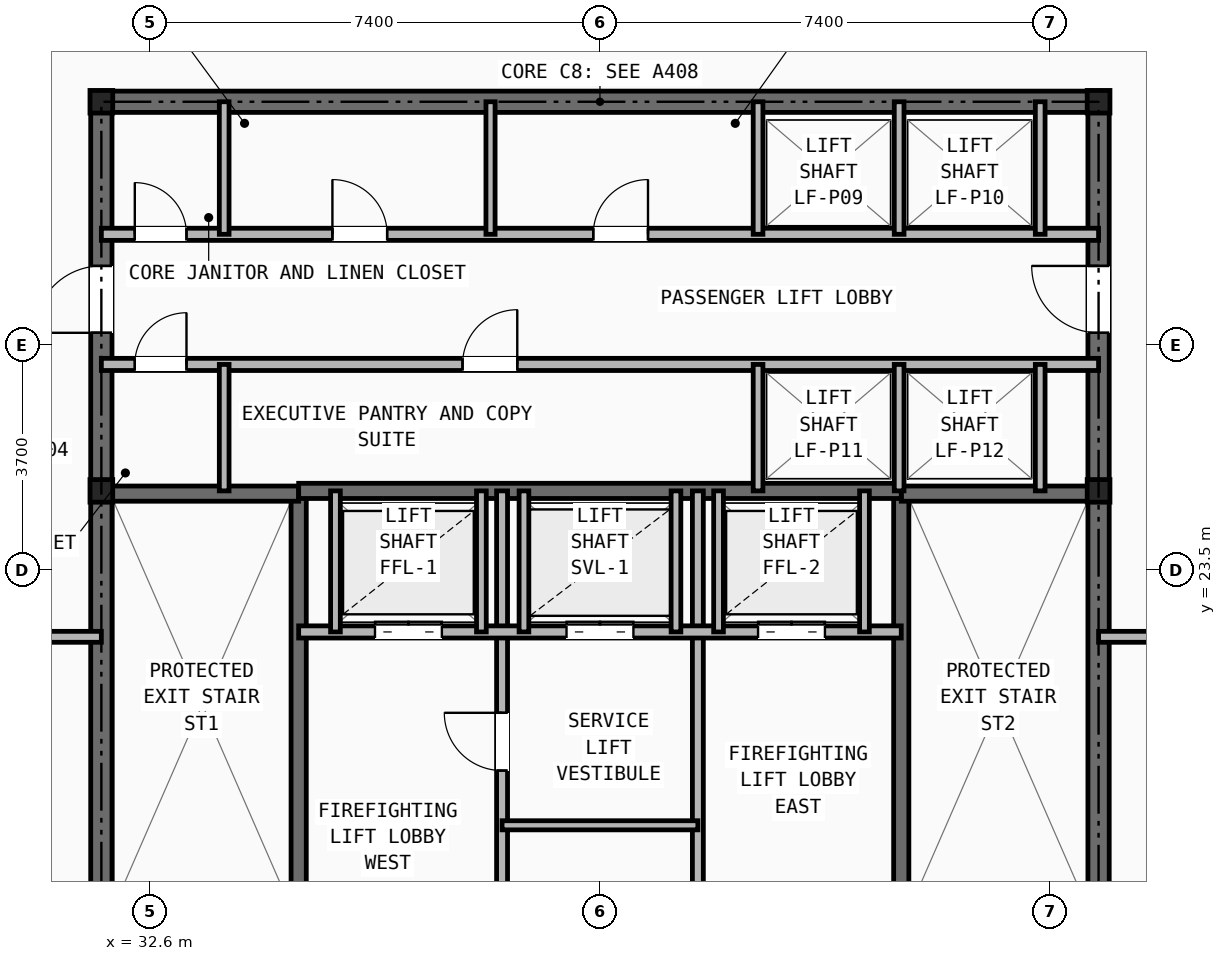
"""IFC4 building model, lengths in metres.
Left out: names, types, materials, properties, quantities, classifications, styles, units other than length and angle.
Written with IfcOpenShell. Run it as: python <this file> out.ifc"""

import sys

from ifc_helpers import new_model, si_unit, direction, frame, frame_2d, origin, origin_2d, place, context, subcontext, project, spatial, rectangle, i_section, extrude, element, fill, save


model = new_model("IFC4")
c1 = context("Model", 3, precision=1e-05, world=origin(), true_north=direction((0.0, 1.0)))
c2 = subcontext(c1, "Body", "Model", "MODEL_VIEW")
j1 = project(units=[si_unit("LENGTHUNIT", "METRE"), si_unit("PLANEANGLEUNIT", "RADIAN")], contexts=[c1])
p1 = place(None, origin())
s1 = spatial("IfcSite", under=j1, at=p1, CompositionType="ELEMENT")
p2 = place(p1, origin())
s2 = spatial("IfcBuilding", under=s1, at=p2, CompositionType="ELEMENT")
p3 = place(p2, frame((0.0, 0.0, 290.0)))
s3 = spatial("IfcBuildingStorey", under=s2, at=p3, CompositionType="ELEMENT", Elevation=290.0)
for number, where, z_axis, x_axis in (
    (1, (31.8, 24.8, 0.0), (0.0, 0.0, 1.0), (1.0, 0.0, 0.0)),
    (2, (48.2, 24.8, 0.0), (0.0, 0.0, 1.0), (1.0, 0.0, 0.0)),
    (3, (31.8, 31.2, 0.0), (0.0, 0.0, 1.0), (1.0, 0.0, 0.0)),
    (4, (48.2, 31.2, 0.0), (0.0, 0.0, 1.0), (1.0, 0.0, 0.0)),
):
    element("IfcColumn", number, at=place(p3, frame(where, z_axis=z_axis, x_axis=x_axis)), inside=s3, PredefinedType="COLUMN", context=c2, shape_type="SweptSolid", body=[
        extrude(i_section(OverallWidth=0.374, OverallDepth=0.372, WebThickness=0.016, FlangeThickness=0.026, at=origin_2d()), origin(), (0.0, 0.0, 1.0), 4.8),
    ])
p4 = place(p3, frame((31.8, 31.2, 0.0), z_axis=(0.0, 0.0, 1.0), x_axis=(1.0, 0.0, 0.0)))
e5 = element("IfcWall", 5, at=p4, inside=s3, PredefinedType="SHEAR", context=c2, shape_type="SweptSolid", body=[
    extrude(rectangle(XDim=16.4, YDim=0.35, at=frame_2d((8.2, 0.0))), origin(), (0.0, 0.0, 1.0), 4.54),
])
p5 = place(p3, frame((31.8, 16.4, 0.0), z_axis=(0.0, 0.0, 1.0), x_axis=(0.0, 1.0, 0.0)))
e6 = element("IfcWall", 6, at=p5, inside=s3, PredefinedType="SHEAR", context=c2, shape_type="SweptSolid", body=[
    extrude(rectangle(XDim=14.8, YDim=0.35, at=frame_2d((7.4, 0.0))), origin(), (0.0, 0.0, 1.0), 4.54),
])
p6 = place(p5, frame((11.0, 0.0, 0.0)))
e7 = element("IfcOpeningElement", 7, at=p6, cuts=e6, PredefinedType="OPENING", context=c2, shape_type="SweptSolid", body=[
    extrude(rectangle(XDim=1.1, YDim=2.15, at=frame_2d((0.55, 1.075))), frame((0.0, 0.185, 0.0), z_axis=(0.0, -1.0, 0.0), x_axis=(1.0, 0.0, 0.0)), (0.0, 0.0, 1.0), 0.37),
])
p7 = place(p5, frame((0.45, 0.0, 0.0)))
e8 = element("IfcOpeningElement", 8, at=p7, cuts=e6, PredefinedType="OPENING", context=c2, shape_type="SweptSolid", body=[
    extrude(rectangle(XDim=0.95, YDim=2.1, at=frame_2d((0.475, 1.05))), frame((0.0, 0.185, 0.0), z_axis=(0.0, -1.0, 0.0), x_axis=(1.0, 0.0, 0.0)), (0.0, 0.0, 1.0), 0.37),
])
p8 = place(p3, frame((48.2, 16.4, 0.0), z_axis=(0.0, 0.0, 1.0), x_axis=(0.0, 1.0, 0.0)))
e9 = element("IfcWall", 9, at=p8, inside=s3, PredefinedType="SHEAR", context=c2, shape_type="SweptSolid", body=[
    extrude(rectangle(XDim=14.8, YDim=0.35, at=frame_2d((7.4, 0.0))), origin(), (0.0, 0.0, 1.0), 4.54),
])
p9 = place(p8, frame((11.0, 0.0, 0.0)))
e10 = element("IfcOpeningElement", 10, at=p9, cuts=e9, PredefinedType="OPENING", context=c2, shape_type="SweptSolid", body=[
    extrude(rectangle(XDim=1.1, YDim=2.15, at=frame_2d((0.55, 1.075))), frame((0.0, 0.185, 0.0), z_axis=(0.0, -1.0, 0.0), x_axis=(1.0, 0.0, 0.0)), (0.0, 0.0, 1.0), 0.37),
])
p10 = place(p8, frame((0.45, 0.0, 0.0)))
e11 = element("IfcOpeningElement", 11, at=p10, cuts=e9, PredefinedType="OPENING", context=c2, shape_type="SweptSolid", body=[
    extrude(rectangle(XDim=0.95, YDim=2.1, at=frame_2d((0.475, 1.05))), frame((0.0, 0.185, 0.0), z_axis=(0.0, -1.0, 0.0), x_axis=(1.0, 0.0, 0.0)), (0.0, 0.0, 1.0), 0.37),
])
p11 = place(p3, frame((35.045, 16.4, 0.0), z_axis=(0.0, 0.0, 1.0), x_axis=(0.0, 1.0, 0.0)))
e12 = element("IfcWall", 12, at=p11, inside=s3, PredefinedType="SHEAR", context=c2, shape_type="SweptSolid", body=[
    extrude(rectangle(XDim=8.4, YDim=0.25, at=frame_2d((4.2, 0.0))), origin(), (0.0, 0.0, 1.0), 4.54),
])
p12 = place(p11, frame((0.45, 0.0, 0.0)))
e13 = element("IfcOpeningElement", 13, at=p12, cuts=e12, PredefinedType="OPENING", context=c2, shape_type="SweptSolid", body=[
    extrude(rectangle(XDim=0.95, YDim=2.1, at=frame_2d((0.475, 1.05))), frame((0.0, 0.135, 0.0), z_axis=(0.0, -1.0, 0.0), x_axis=(1.0, 0.0, 0.0)), (0.0, 0.0, 1.0), 0.27),
])
p13 = place(p3, frame((31.8, 24.755, 0.0), z_axis=(0.0, 0.0, 1.0), x_axis=(1.0, 0.0, 0.0)))
e14 = element("IfcWall", 14, at=p13, inside=s3, PredefinedType="SHEAR", context=c2, shape_type="SweptSolid", body=[
    extrude(rectangle(XDim=3.245, YDim=0.25, at=frame_2d((1.623, 0.0))), origin(), (0.0, 0.0, 1.0), 4.54),
])
p14 = place(p3, frame((44.955, 16.4, 0.0), z_axis=(0.0, 0.0, 1.0), x_axis=(0.0, 1.0, 0.0)))
e15 = element("IfcWall", 15, at=p14, inside=s3, PredefinedType="SHEAR", context=c2, shape_type="SweptSolid", body=[
    extrude(rectangle(XDim=8.4, YDim=0.25, at=frame_2d((4.2, 0.0))), origin(), (0.0, 0.0, 1.0), 4.54),
])
p15 = place(p14, frame((0.45, 0.0, 0.0)))
e16 = element("IfcOpeningElement", 16, at=p15, cuts=e15, PredefinedType="OPENING", context=c2, shape_type="SweptSolid", body=[
    extrude(rectangle(XDim=0.95, YDim=2.1, at=frame_2d((0.475, 1.05))), frame((0.0, 0.135, 0.0), z_axis=(0.0, -1.0, 0.0), x_axis=(1.0, 0.0, 0.0)), (0.0, 0.0, 1.0), 0.27),
])
p16 = place(p3, frame((44.955, 24.755, 0.0), z_axis=(0.0, 0.0, 1.0), x_axis=(1.0, 0.0, 0.0)))
e17 = element("IfcWall", 17, at=p16, inside=s3, PredefinedType="SHEAR", context=c2, shape_type="SweptSolid", body=[
    extrude(rectangle(XDim=3.245, YDim=0.25, at=frame_2d((1.623, 0.0))), origin(), (0.0, 0.0, 1.0), 4.54),
])
p17 = place(p3, frame((35.045, 24.8, 0.0), z_axis=(0.0, 0.0, 1.0), x_axis=(1.0, 0.0, 0.0)))
e18 = element("IfcWall", 18, at=p17, inside=s3, PredefinedType="SHEAR", context=c2, shape_type="SweptSolid", body=[
    extrude(rectangle(XDim=9.91, YDim=0.25, at=frame_2d((4.955, 0.0))), origin(), (0.0, 0.0, 1.0), 4.54),
])
p18 = place(p3, frame((38.39, 16.4, 0.0), z_axis=(0.0, 0.0, 1.0), x_axis=(0.0, 1.0, 0.0)))
e19 = element("IfcWall", 19, at=p18, inside=s3, PredefinedType="PARTITIONING", context=c2, shape_type="SweptSolid", body=[
    extrude(rectangle(XDim=8.4, YDim=0.18, at=frame_2d((4.2, 0.0))), origin(), (0.0, 0.0, 1.0), 3.995),
])
p19 = place(p18, frame((3.8, 0.0, 0.0)))
e20 = element("IfcOpeningElement", 20, at=p19, cuts=e19, PredefinedType="OPENING", context=c2, shape_type="SweptSolid", body=[
    extrude(rectangle(XDim=0.95, YDim=2.1, at=frame_2d((0.475, 1.05))), frame((0.0, 0.1, 0.0), z_axis=(0.0, -1.0, 0.0), x_axis=(1.0, 0.0, 0.0)), (0.0, 0.0, 1.0), 0.2),
])
p20 = place(p3, frame((41.61, 16.4, 0.0), z_axis=(0.0, 0.0, 1.0), x_axis=(0.0, 1.0, 0.0)))
e21 = element("IfcWall", 21, at=p20, inside=s3, PredefinedType="PARTITIONING", context=c2, shape_type="SweptSolid", body=[
    extrude(rectangle(XDim=8.4, YDim=0.18, at=frame_2d((4.2, 0.0))), origin(), (0.0, 0.0, 1.0), 3.995),
])
p21 = place(p3, frame((35.045, 22.48, 0.0), z_axis=(0.0, 0.0, 1.0), x_axis=(1.0, 0.0, 0.0)))
e22 = element("IfcWall", 22, at=p21, inside=s3, PredefinedType="SOLIDWALL", context=c2, shape_type="SweptSolid", body=[
    extrude(rectangle(XDim=9.91, YDim=0.2, at=frame_2d((4.955, 0.0))), origin(), (0.0, 0.0, 1.0), 4.54),
])
p22 = place(p21, frame((1.255, 0.0, 0.0)))
e23 = element("IfcOpeningElement", 23, at=p22, cuts=e22, PredefinedType="OPENING", context=c2, shape_type="SweptSolid", body=[
    extrude(rectangle(XDim=1.1, YDim=2.15, at=frame_2d((0.55, 1.075))), frame((0.0, 0.11, 0.0), z_axis=(0.0, -1.0, 0.0), x_axis=(1.0, 0.0, 0.0)), (0.0, 0.0, 1.0), 0.22),
])
p23 = place(p21, frame((7.555, 0.0, 0.0)))
e24 = element("IfcOpeningElement", 24, at=p23, cuts=e22, PredefinedType="OPENING", context=c2, shape_type="SweptSolid", body=[
    extrude(rectangle(XDim=1.1, YDim=2.15, at=frame_2d((0.55, 1.075))), frame((0.0, 0.11, 0.0), z_axis=(0.0, -1.0, 0.0), x_axis=(1.0, 0.0, 0.0)), (0.0, 0.0, 1.0), 0.22),
])
p24 = place(p21, frame((4.405, 0.0, 0.0)))
e25 = element("IfcOpeningElement", 25, at=p24, cuts=e22, PredefinedType="OPENING", context=c2, shape_type="SweptSolid", body=[
    extrude(rectangle(XDim=1.1, YDim=2.15, at=frame_2d((0.55, 1.075))), frame((0.0, 0.11, 0.0), z_axis=(0.0, -1.0, 0.0), x_axis=(1.0, 0.0, 0.0)), (0.0, 0.0, 1.0), 0.22),
])
p25 = place(p3, frame((38.39, 19.3, 0.0), z_axis=(0.0, 0.0, 1.0), x_axis=(1.0, 0.0, 0.0)))
e26 = element("IfcWall", 26, at=p25, inside=s3, PredefinedType="PARTITIONING", context=c2, shape_type="SweptSolid", body=[
    extrude(rectangle(XDim=3.22, YDim=0.15, at=frame_2d((1.61, 0.0))), origin(), (0.0, 0.0, 1.0), 4.54),
])
for number, where, z_axis, x_axis in (
    (27, (35.65, 22.48, 0.0), (0.0, 0.0, 1.0), (0.0, 1.0, 0.0)),
    (28, (38.05, 22.48, 0.0), (0.0, 0.0, 1.0), (0.0, 1.0, 0.0)),
    (29, (41.95, 22.48, 0.0), (0.0, 0.0, 1.0), (0.0, 1.0, 0.0)),
    (30, (44.35, 22.48, 0.0), (0.0, 0.0, 1.0), (0.0, 1.0, 0.0)),
    (31, (38.75, 22.48, 0.0), (0.0, 0.0, 1.0), (0.0, 1.0, 0.0)),
    (32, (41.25, 22.48, 0.0), (0.0, 0.0, 1.0), (0.0, 1.0, 0.0)),
):
    element("IfcWall", number, at=place(p3, frame(where, z_axis=z_axis, x_axis=x_axis)), inside=s3, PredefinedType="SOLIDWALL", context=c2, shape_type="SweptSolid", body=[
        extrude(rectangle(XDim=2.32, YDim=0.16, at=frame_2d((1.16, 0.0))), origin(), (0.0, 0.0, 1.0), 4.54),
    ])
p26 = place(p3, frame((31.8, 29.02, 0.0), z_axis=(0.0, 0.0, 1.0), x_axis=(1.0, 0.0, 0.0)))
e33 = element("IfcWall", 33, at=p26, inside=s3, PredefinedType="SOLIDWALL", context=c2, shape_type="SweptSolid", body=[
    extrude(rectangle(XDim=16.4, YDim=0.2, at=frame_2d((8.2, 0.0))), origin(), (0.0, 0.0, 1.0), 3.995),
])
p27 = place(p26, frame((0.55, 0.0, 0.0)))
e34 = element("IfcOpeningElement", 34, at=p27, cuts=e33, PredefinedType="OPENING", context=c2, shape_type="SweptSolid", body=[
    extrude(rectangle(XDim=0.85, YDim=2.05, at=frame_2d((0.425, 1.025))), frame((0.0, 0.11, 0.0), z_axis=(0.0, -1.0, 0.0), x_axis=(1.0, 0.0, 0.0)), (0.0, 0.0, 1.0), 0.22),
])
p28 = place(p26, frame((3.8, 0.0, 0.0)))
e35 = element("IfcOpeningElement", 35, at=p28, cuts=e33, PredefinedType="OPENING", context=c2, shape_type="SweptSolid", body=[
    extrude(rectangle(XDim=0.9, YDim=2.1, at=frame_2d((0.45, 1.05))), frame((0.0, 0.11, 0.0), z_axis=(0.0, -1.0, 0.0), x_axis=(1.0, 0.0, 0.0)), (0.0, 0.0, 1.0), 0.22),
])
p29 = place(p26, frame((8.09, 0.0, 0.0)))
e36 = element("IfcOpeningElement", 36, at=p29, cuts=e33, PredefinedType="OPENING", context=c2, shape_type="SweptSolid", body=[
    extrude(rectangle(XDim=0.9, YDim=2.1, at=frame_2d((0.45, 1.05))), frame((0.0, 0.11, 0.0), z_axis=(0.0, -1.0, 0.0), x_axis=(1.0, 0.0, 0.0)), (0.0, 0.0, 1.0), 0.22),
])
p30 = place(p3, frame((31.8, 26.88, 0.0), z_axis=(0.0, 0.0, 1.0), x_axis=(1.0, 0.0, 0.0)))
e37 = element("IfcWall", 37, at=p30, inside=s3, PredefinedType="SOLIDWALL", context=c2, shape_type="SweptSolid", body=[
    extrude(rectangle(XDim=16.4, YDim=0.2, at=frame_2d((8.2, 0.0))), origin(), (0.0, 0.0, 1.0), 3.995),
])
p31 = place(p30, frame((0.55, 0.0, 0.0)))
e38 = element("IfcOpeningElement", 38, at=p31, cuts=e37, PredefinedType="OPENING", context=c2, shape_type="SweptSolid", body=[
    extrude(rectangle(XDim=0.85, YDim=2.05, at=frame_2d((0.425, 1.025))), frame((0.0, 0.11, 0.0), z_axis=(0.0, -1.0, 0.0), x_axis=(1.0, 0.0, 0.0)), (0.0, 0.0, 1.0), 0.22),
])
p32 = place(p30, frame((5.94, 0.0, 0.0)))
e39 = element("IfcOpeningElement", 39, at=p32, cuts=e37, PredefinedType="OPENING", context=c2, shape_type="SweptSolid", body=[
    extrude(rectangle(XDim=0.9, YDim=2.1, at=frame_2d((0.45, 1.05))), frame((0.0, 0.11, 0.0), z_axis=(0.0, -1.0, 0.0), x_axis=(1.0, 0.0, 0.0)), (0.0, 0.0, 1.0), 0.22),
])
p33 = place(p3, frame((33.82, 29.02, 0.0), z_axis=(0.0, 0.0, 1.0), x_axis=(0.0, 1.0, 0.0)))
e40 = element("IfcWall", 40, at=p33, inside=s3, PredefinedType="SOLIDWALL", context=c2, shape_type="SweptSolid", body=[
    extrude(rectangle(XDim=2.18, YDim=0.16, at=frame_2d((1.09, 0.0))), origin(), (0.0, 0.0, 1.0), 3.995),
])
p34 = place(p3, frame((33.82, 24.8, 0.0), z_axis=(0.0, 0.0, 1.0), x_axis=(0.0, 1.0, 0.0)))
e41 = element("IfcWall", 41, at=p34, inside=s3, PredefinedType="SOLIDWALL", context=c2, shape_type="SweptSolid", body=[
    extrude(rectangle(XDim=2.08, YDim=0.16, at=frame_2d((1.04, 0.0))), origin(), (0.0, 0.0, 1.0), 4.54),
])
p35 = place(p3, frame((38.2, 29.02, 0.0), z_axis=(0.0, 0.0, 1.0), x_axis=(0.0, 1.0, 0.0)))
e42 = element("IfcWall", 42, at=p35, inside=s3, PredefinedType="PARTITIONING", context=c2, shape_type="SweptSolid", body=[
    extrude(rectangle(XDim=2.18, YDim=0.15, at=frame_2d((1.09, 0.0))), origin(), (0.0, 0.0, 1.0), 3.995),
])
for number, where, z_axis, x_axis in (
    (43, (42.6, 29.02, 0.0), (0.0, 0.0, 1.0), (0.0, 1.0, 0.0)),
    (44, (44.92, 29.02, 0.0), (0.0, 0.0, 1.0), (0.0, 1.0, 0.0)),
    (45, (47.24, 29.02, 0.0), (0.0, 0.0, 1.0), (0.0, 1.0, 0.0)),
):
    element("IfcWall", number, at=place(p3, frame(where, z_axis=z_axis, x_axis=x_axis)), inside=s3, PredefinedType="SOLIDWALL", context=c2, shape_type="SweptSolid", body=[
        extrude(rectangle(XDim=2.18, YDim=0.16, at=frame_2d((1.09, 0.0))), origin(), (0.0, 0.0, 1.0), 3.995),
    ])
for number, where, z_axis, x_axis in (
    (46, (42.6, 24.8, 0.0), (0.0, 0.0, 1.0), (0.0, 1.0, 0.0)),
    (47, (44.92, 24.8, 0.0), (0.0, 0.0, 1.0), (0.0, 1.0, 0.0)),
    (48, (47.24, 24.8, 0.0), (0.0, 0.0, 1.0), (0.0, 1.0, 0.0)),
):
    element("IfcWall", number, at=place(p3, frame(where, z_axis=z_axis, x_axis=x_axis)), inside=s3, PredefinedType="SOLIDWALL", context=c2, shape_type="SweptSolid", body=[
        extrude(rectangle(XDim=2.08, YDim=0.16, at=frame_2d((1.04, 0.0))), origin(), (0.0, 0.0, 1.0), 4.54),
    ])
p36 = place(p3, frame((25.8, 22.4, 0.0), z_axis=(0.0, 0.0, 1.0), x_axis=(1.0, 0.0, 0.0)))
e49 = element("IfcWall", 49, at=p36, inside=s3, PredefinedType="PARTITIONING", context=c2, shape_type="SweptSolid", body=[
    extrude(rectangle(XDim=6.0, YDim=0.18, at=frame_2d((3.0, 0.0))), origin(), (0.0, 0.0, 1.0), 3.995),
])
p37 = place(p36, frame((1.6, 0.0, 0.0)))
e50 = element("IfcOpeningElement", 50, at=p37, cuts=e49, PredefinedType="OPENING", context=c2, shape_type="SweptSolid", body=[
    extrude(rectangle(XDim=1.0, YDim=2.15, at=frame_2d((0.5, 1.075))), frame((0.0, 0.1, 0.0), z_axis=(0.0, -1.0, 0.0), x_axis=(1.0, 0.0, 0.0)), (0.0, 0.0, 1.0), 0.2),
])
p38 = place(p3, frame((48.2, 22.4, 0.0), z_axis=(0.0, 0.0, 1.0), x_axis=(1.0, 0.0, 0.0)))
e51 = element("IfcWall", 51, at=p38, inside=s3, PredefinedType="PARTITIONING", context=c2, shape_type="SweptSolid", body=[
    extrude(rectangle(XDim=6.0, YDim=0.18, at=frame_2d((3.0, 0.0))), origin(), (0.0, 0.0, 1.0), 3.995),
])
p39 = place(p38, frame((1.6, 0.0, 0.0)))
e52 = element("IfcOpeningElement", 52, at=p39, cuts=e51, PredefinedType="OPENING", context=c2, shape_type="SweptSolid", body=[
    extrude(rectangle(XDim=1.0, YDim=2.15, at=frame_2d((0.5, 1.075))), frame((0.0, 0.1, 0.0), z_axis=(0.0, -1.0, 0.0), x_axis=(1.0, 0.0, 0.0)), (0.0, 0.0, 1.0), 0.2),
])
p40 = place(p19, origin())
e53 = element("IfcDoor", 53, at=p40, inside=s3, OperationType="SINGLE_SWING_RIGHT", PredefinedType="DOOR", context=c2, shape_type="SweptSolid", body=[
    extrude(rectangle(XDim=0.95, YDim=2.1, at=frame_2d((0.475, 1.05))), frame((0.0, 0.025, 0.0), z_axis=(0.0, -1.0, 0.0), x_axis=(1.0, 0.0, 0.0)), (0.0, 0.0, 1.0), 0.05),
])
fill(e20, e53)
p41 = place(p22, origin())
e54 = element("IfcDoor", 54, at=p41, inside=s3, OperationType="DOUBLE_DOOR_SLIDING", PredefinedType="DOOR", context=c2, shape_type="SweptSolid", body=[
    extrude(rectangle(XDim=1.1, YDim=2.15, at=frame_2d((0.55, 1.075))), frame((0.0, 0.025, 0.0), z_axis=(0.0, -1.0, 0.0), x_axis=(1.0, 0.0, 0.0)), (0.0, 0.0, 1.0), 0.05),
])
fill(e23, e54)
p42 = place(p23, origin())
e55 = element("IfcDoor", 55, at=p42, inside=s3, OperationType="DOUBLE_DOOR_SLIDING", PredefinedType="DOOR", context=c2, shape_type="SweptSolid", body=[
    extrude(rectangle(XDim=1.1, YDim=2.15, at=frame_2d((0.55, 1.075))), frame((0.0, 0.025, 0.0), z_axis=(0.0, -1.0, 0.0), x_axis=(1.0, 0.0, 0.0)), (0.0, 0.0, 1.0), 0.05),
])
fill(e24, e55)
p43 = place(p24, origin())
e56 = element("IfcDoor", 56, at=p43, inside=s3, OperationType="DOUBLE_DOOR_SLIDING", PredefinedType="DOOR", context=c2, shape_type="SweptSolid", body=[
    extrude(rectangle(XDim=1.1, YDim=2.15, at=frame_2d((0.55, 1.075))), frame((0.0, 0.025, 0.0), z_axis=(0.0, -1.0, 0.0), x_axis=(1.0, 0.0, 0.0)), (0.0, 0.0, 1.0), 0.05),
])
fill(e25, e56)
p44 = place(p27, origin())
e57 = element("IfcDoor", 57, at=p44, inside=s3, OperationType="SINGLE_SWING_LEFT", PredefinedType="DOOR", context=c2, shape_type="SweptSolid", body=[
    extrude(rectangle(XDim=0.85, YDim=2.05, at=frame_2d((0.425, 1.025))), frame((0.0, 0.025, 0.0), z_axis=(0.0, -1.0, 0.0), x_axis=(1.0, 0.0, 0.0)), (0.0, 0.0, 1.0), 0.05),
])
fill(e34, e57)
p45 = place(p31, origin())
e58 = element("IfcDoor", 58, at=p45, inside=s3, OperationType="SINGLE_SWING_RIGHT", PredefinedType="DOOR", context=c2, shape_type="SweptSolid", body=[
    extrude(rectangle(XDim=0.85, YDim=2.05, at=frame_2d((0.425, 1.025))), frame((0.0, 0.025, 0.0), z_axis=(0.0, -1.0, 0.0), x_axis=(1.0, 0.0, 0.0)), (0.0, 0.0, 1.0), 0.05),
])
fill(e38, e58)
p46 = place(p6, origin())
e59 = element("IfcDoor", 59, at=p46, inside=s3, OperationType="SINGLE_SWING_LEFT", PredefinedType="DOOR", context=c2, shape_type="SweptSolid", body=[
    extrude(rectangle(XDim=1.1, YDim=2.15, at=frame_2d((0.55, 1.075))), frame((0.0, 0.025, 0.0), z_axis=(0.0, -1.0, 0.0), x_axis=(1.0, 0.0, 0.0)), (0.0, 0.0, 1.0), 0.05),
])
fill(e7, e59)
p47 = place(p9, origin())
e60 = element("IfcDoor", 60, at=p47, inside=s3, OperationType="SINGLE_SWING_RIGHT", PredefinedType="DOOR", context=c2, shape_type="SweptSolid", body=[
    extrude(rectangle(XDim=1.1, YDim=2.15, at=frame_2d((0.55, 1.075))), frame((0.0, 0.025, 0.0), z_axis=(0.0, -1.0, 0.0), x_axis=(1.0, 0.0, 0.0)), (0.0, 0.0, 1.0), 0.05),
])
fill(e10, e60)
p48 = place(p28, origin())
e61 = element("IfcDoor", 61, at=p48, inside=s3, OperationType="SINGLE_SWING_LEFT", PredefinedType="DOOR", context=c2, shape_type="SweptSolid", body=[
    extrude(rectangle(XDim=0.9, YDim=2.1, at=frame_2d((0.45, 1.05))), frame((0.0, 0.025, 0.0), z_axis=(0.0, -1.0, 0.0), x_axis=(1.0, 0.0, 0.0)), (0.0, 0.0, 1.0), 0.05),
])
fill(e35, e61)
p49 = place(p29, origin())
e62 = element("IfcDoor", 62, at=p49, inside=s3, OperationType="SINGLE_SWING_RIGHT", PredefinedType="DOOR", context=c2, shape_type="SweptSolid", body=[
    extrude(rectangle(XDim=0.9, YDim=2.1, at=frame_2d((0.45, 1.05))), frame((0.0, 0.025, 0.0), z_axis=(0.0, -1.0, 0.0), x_axis=(1.0, 0.0, 0.0)), (0.0, 0.0, 1.0), 0.05),
])
fill(e36, e62)
p50 = place(p32, origin())
e63 = element("IfcDoor", 63, at=p50, inside=s3, OperationType="SINGLE_SWING_RIGHT", PredefinedType="DOOR", context=c2, shape_type="SweptSolid", body=[
    extrude(rectangle(XDim=0.9, YDim=2.1, at=frame_2d((0.45, 1.05))), frame((0.0, 0.025, 0.0), z_axis=(0.0, -1.0, 0.0), x_axis=(1.0, 0.0, 0.0)), (0.0, 0.0, 1.0), 0.05),
])
fill(e39, e63)
save(model, sys.argv[1])
